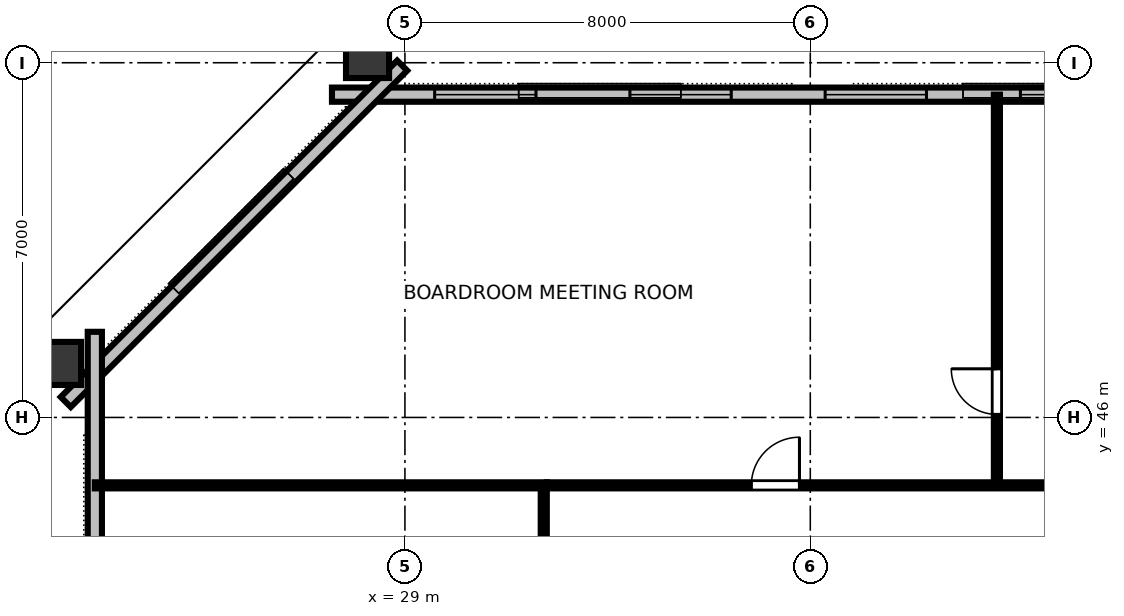
"""IFC4 building model, lengths in metres.
Left out: names, types, materials, properties, quantities, classifications, styles, units other than length and angle.
Written with IfcOpenShell. Run it as: python <this file> out.ifc"""

import sys

from ifc_helpers import new_model, si_unit, direction, frame, frame_2d, origin, origin_2d, place, context, subcontext, project, spatial, rectangle, hollow_rectangle, extrude, element, fill, save


model = new_model("IFC4")
c1 = context("Model", 3, precision=1e-05, world=origin(), true_north=direction((0.0, 1.0)))
c2 = subcontext(c1, "Body", "Model", "MODEL_VIEW")
j1 = project(units=[si_unit("LENGTHUNIT", "METRE"), si_unit("PLANEANGLEUNIT", "RADIAN")], contexts=[c1])
p1 = place(None, origin())
s1 = spatial("IfcSite", under=j1, at=p1, CompositionType="ELEMENT")
p2 = place(p1, origin())
s2 = spatial("IfcBuilding", under=s1, at=p2, CompositionType="ELEMENT")
p3 = place(p2, frame((0.0, 0.0, 156.4)))
s3 = spatial("IfcBuildingStorey", under=s2, at=p3, CompositionType="ELEMENT", Elevation=156.4)
p4 = place(p3, frame((28.262, 53.198, 0.0), z_axis=(-0.059345391748, 0.074109367256, 0.995482760355), x_axis=(-0.780571247111, -0.625066818975, 0.0)))
e1 = element("IfcColumn", 1, at=p4, inside=s3, PredefinedType="COLUMN", context=c2, shape_type="SweptSolid", body=[
    extrude(hollow_rectangle(XDim=0.85, YDim=1.0, WallThickness=0.05, at=origin_2d()), origin(), (0.0, 0.0, 1.0), 3.373),
])
p5 = place(p3, frame((22.109, 47.066, 0.0), z_axis=(-0.088690794811, 0.044634763783, 0.995058631829), x_axis=(0.888844480388, -0.447322222186, 0.099289068996)))
e2 = element("IfcColumn", 2, at=p5, inside=s3, PredefinedType="COLUMN", context=c2, shape_type="SweptSolid", body=[
    extrude(hollow_rectangle(XDim=0.85, YDim=1.0, WallThickness=0.05, at=origin_2d()), origin(), (0.0, 0.0, 1.0), 3.375),
])
p6 = place(p3, frame((64.44, 52.37, 0.0), z_axis=(0.0, 0.0, 1.0), x_axis=(-1.0, 0.0, 0.0)))
e3 = element("IfcWall", 3, at=p6, inside=s3, PredefinedType="STANDARD", context=c2, shape_type="SweptSolid", body=[
    extrude(rectangle(XDim=36.88, YDim=0.28, at=frame_2d((18.44, 0.0))), origin(), (0.0, 0.0, 1.0), 3.36),
])
p7 = place(p6, frame((2.027, 0.0, 0.8)))
e4 = element("IfcOpeningElement", 4, at=p7, cuts=e3, PredefinedType="OPENING", context=c2, shape_type="SweptSolid", body=[
    extrude(rectangle(XDim=2.0, YDim=1.95, at=frame_2d((1.0, 0.975))), frame((0.0, 0.15, 0.0), z_axis=(0.0, -1.0, 0.0), x_axis=(1.0, 0.0, 0.0)), (0.0, 0.0, 1.0), 0.3),
])
p8 = place(p6, frame((5.88, 0.0, 0.8)))
e5 = element("IfcOpeningElement", 5, at=p8, cuts=e3, PredefinedType="OPENING", context=c2, shape_type="SweptSolid", body=[
    extrude(rectangle(XDim=2.0, YDim=1.95, at=frame_2d((1.0, 0.975))), frame((0.0, 0.15, 0.0), z_axis=(0.0, -1.0, 0.0), x_axis=(1.0, 0.0, 0.0)), (0.0, 0.0, 1.0), 0.3),
])
p9 = place(p6, frame((13.587, 0.0, 0.8)))
e6 = element("IfcOpeningElement", 6, at=p9, cuts=e3, PredefinedType="OPENING", context=c2, shape_type="SweptSolid", body=[
    extrude(rectangle(XDim=2.0, YDim=1.95, at=frame_2d((1.0, 0.975))), frame((0.0, 0.15, 0.0), z_axis=(0.0, -1.0, 0.0), x_axis=(1.0, 0.0, 0.0)), (0.0, 0.0, 1.0), 0.3),
])
p10 = place(p6, frame((21.293, 0.0, 0.8)))
e7 = element("IfcOpeningElement", 7, at=p10, cuts=e3, PredefinedType="OPENING", context=c2, shape_type="SweptSolid", body=[
    extrude(rectangle(XDim=2.0, YDim=1.95, at=frame_2d((1.0, 0.975))), frame((0.0, 0.15, 0.0), z_axis=(0.0, -1.0, 0.0), x_axis=(1.0, 0.0, 0.0)), (0.0, 0.0, 1.0), 0.3),
])
p11 = place(p6, frame((25.147, 0.0, 0.8)))
e8 = element("IfcOpeningElement", 8, at=p11, cuts=e3, PredefinedType="OPENING", context=c2, shape_type="SweptSolid", body=[
    extrude(rectangle(XDim=2.0, YDim=1.95, at=frame_2d((1.0, 0.975))), frame((0.0, 0.15, 0.0), z_axis=(0.0, -1.0, 0.0), x_axis=(1.0, 0.0, 0.0)), (0.0, 0.0, 1.0), 0.3),
])
p12 = place(p6, frame((29.0, 0.0, 0.8)))
e9 = element("IfcOpeningElement", 9, at=p12, cuts=e3, PredefinedType="OPENING", context=c2, shape_type="SweptSolid", body=[
    extrude(rectangle(XDim=2.0, YDim=1.95, at=frame_2d((1.0, 0.975))), frame((0.0, 0.15, 0.0), z_axis=(0.0, -1.0, 0.0), x_axis=(1.0, 0.0, 0.0)), (0.0, 0.0, 1.0), 0.3),
])
p13 = place(p6, frame((32.853, 0.0, 0.8)))
e10 = element("IfcOpeningElement", 10, at=p13, cuts=e3, PredefinedType="OPENING", context=c2, shape_type="SweptSolid", body=[
    extrude(rectangle(XDim=2.0, YDim=1.95, at=frame_2d((1.0, 0.975))), frame((0.0, 0.15, 0.0), z_axis=(0.0, -1.0, 0.0), x_axis=(1.0, 0.0, 0.0)), (0.0, 0.0, 1.0), 0.3),
])
p14 = place(p3, frame((28.946, 52.944, 0.0), z_axis=(0.0, 0.0, 1.0), x_axis=(-0.707106781187, -0.707106781187, 0.0)))
e11 = element("IfcWall", 11, at=p14, inside=s3, PredefinedType="STANDARD", context=c2, shape_type="SweptSolid", body=[
    extrude(rectangle(XDim=9.39, YDim=0.28, at=frame_2d((4.695, 0.0))), origin(), (0.0, 0.0, 1.0), 3.36),
])
p15 = place(p3, frame((22.88, 47.69, 0.0), z_axis=(0.0, 0.0, 1.0), x_axis=(0.0, -1.0, 0.0)))
e12 = element("IfcWall", 12, at=p15, inside=s3, PredefinedType="STANDARD", context=c2, shape_type="SweptSolid", body=[
    extrude(rectangle(XDim=31.38, YDim=0.28, at=frame_2d((15.69, 0.0))), origin(), (0.0, 0.0, 1.0), 3.36),
])
p16 = place(p15, frame((5.571, 0.0, 0.8)))
e13 = element("IfcOpeningElement", 13, at=p16, cuts=e12, PredefinedType="OPENING", context=c2, shape_type="SweptSolid", body=[
    extrude(rectangle(XDim=2.0, YDim=1.95, at=frame_2d((1.0, 0.975))), frame((0.0, 0.15, 0.0), z_axis=(0.0, -1.0, 0.0), x_axis=(1.0, 0.0, 0.0)), (0.0, 0.0, 1.0), 0.3),
])
p17 = place(p15, frame((12.866, 0.0, 0.8)))
e14 = element("IfcOpeningElement", 14, at=p17, cuts=e12, PredefinedType="OPENING", context=c2, shape_type="SweptSolid", body=[
    extrude(rectangle(XDim=2.0, YDim=1.95, at=frame_2d((1.0, 0.975))), frame((0.0, 0.15, 0.0), z_axis=(0.0, -1.0, 0.0), x_axis=(1.0, 0.0, 0.0)), (0.0, 0.0, 1.0), 0.3),
])
p18 = place(p15, frame((16.514, 0.0, 0.8)))
e15 = element("IfcOpeningElement", 15, at=p18, cuts=e12, PredefinedType="OPENING", context=c2, shape_type="SweptSolid", body=[
    extrude(rectangle(XDim=2.0, YDim=1.95, at=frame_2d((1.0, 0.975))), frame((0.0, 0.15, 0.0), z_axis=(0.0, -1.0, 0.0), x_axis=(1.0, 0.0, 0.0)), (0.0, 0.0, 1.0), 0.3),
])
p19 = place(p15, frame((20.161, 0.0, 0.8)))
e16 = element("IfcOpeningElement", 16, at=p19, cuts=e12, PredefinedType="OPENING", context=c2, shape_type="SweptSolid", body=[
    extrude(rectangle(XDim=2.0, YDim=1.95, at=frame_2d((1.0, 0.975))), frame((0.0, 0.15, 0.0), z_axis=(0.0, -1.0, 0.0), x_axis=(1.0, 0.0, 0.0)), (0.0, 0.0, 1.0), 0.3),
])
p20 = place(p15, frame((23.809, 0.0, 0.8)))
e17 = element("IfcOpeningElement", 17, at=p20, cuts=e12, PredefinedType="OPENING", context=c2, shape_type="SweptSolid", body=[
    extrude(rectangle(XDim=2.0, YDim=1.95, at=frame_2d((1.0, 0.975))), frame((0.0, 0.15, 0.0), z_axis=(0.0, -1.0, 0.0), x_axis=(1.0, 0.0, 0.0)), (0.0, 0.0, 1.0), 0.3),
])
p21 = place(p3, frame((40.683, 44.66, 0.0), z_axis=(0.0, 0.0, 1.0), x_axis=(0.0, 1.0, 0.0)))
e18 = element("IfcWall", 18, at=p21, inside=s3, PredefinedType="PARTITIONING", context=c2, shape_type="SweptSolid", body=[
    extrude(rectangle(XDim=7.71, YDim=0.12, at=frame_2d((3.855, 0.0))), origin(), (0.0, 0.0, 1.0), 2.64),
])
p22 = place(p21, frame((1.4, 0.0, 0.0)))
e19 = element("IfcOpeningElement", 19, at=p22, cuts=e18, PredefinedType="OPENING", context=c2, shape_type="SweptSolid", body=[
    extrude(rectangle(XDim=0.9, YDim=2.15, at=frame_2d((0.45, 1.075))), frame((0.0, 0.07, 0.0), z_axis=(0.0, -1.0, 0.0), x_axis=(1.0, 0.0, 0.0)), (0.0, 0.0, 1.0), 0.14),
])
p23 = place(p3, frame((31.8, 44.66, 0.0), z_axis=(0.0, 0.0, 1.0), x_axis=(1.0, 0.0, 0.0)))
e20 = element("IfcWall", 20, at=p23, inside=s3, PredefinedType="PARTITIONING", context=c2, shape_type="SweptSolid", body=[
    extrude(rectangle(XDim=28.4, YDim=0.12, at=frame_2d((14.2, 0.0))), origin(), (0.0, 0.0, 1.0), 2.64),
])
p24 = place(p23, frame((4.036, 0.0, 0.0)))
e21 = element("IfcOpeningElement", 21, at=p24, cuts=e20, PredefinedType="OPENING", context=c2, shape_type="SweptSolid", body=[
    extrude(rectangle(XDim=0.95, YDim=2.15, at=frame_2d((0.475, 1.075))), frame((0.0, 0.07, 0.0), z_axis=(0.0, -1.0, 0.0), x_axis=(1.0, 0.0, 0.0)), (0.0, 0.0, 1.0), 0.14),
])
p25 = place(p23, frame((12.256, 0.0, 0.0)))
e22 = element("IfcOpeningElement", 22, at=p25, cuts=e20, PredefinedType="OPENING", context=c2, shape_type="SweptSolid", body=[
    extrude(rectangle(XDim=0.95, YDim=2.15, at=frame_2d((0.475, 1.075))), frame((0.0, 0.07, 0.0), z_axis=(0.0, -1.0, 0.0), x_axis=(1.0, 0.0, 0.0)), (0.0, 0.0, 1.0), 0.14),
])
p26 = place(p23, frame((18.246, 0.0, 0.0)))
e23 = element("IfcOpeningElement", 23, at=p26, cuts=e20, PredefinedType="OPENING", context=c2, shape_type="SweptSolid", body=[
    extrude(rectangle(XDim=0.95, YDim=2.15, at=frame_2d((0.475, 1.075))), frame((0.0, 0.07, 0.0), z_axis=(0.0, -1.0, 0.0), x_axis=(1.0, 0.0, 0.0)), (0.0, 0.0, 1.0), 0.14),
])
p27 = place(p23, frame((24.086, 0.0, 0.0)))
e24 = element("IfcOpeningElement", 24, at=p27, cuts=e20, PredefinedType="OPENING", context=c2, shape_type="SweptSolid", body=[
    extrude(rectangle(XDim=0.95, YDim=2.15, at=frame_2d((0.475, 1.075))), frame((0.0, 0.07, 0.0), z_axis=(0.0, -1.0, 0.0), x_axis=(1.0, 0.0, 0.0)), (0.0, 0.0, 1.0), 0.14),
])
p28 = place(p3, frame((31.74, 33.02, 0.0), z_axis=(0.0, 0.0, 1.0), x_axis=(0.0, 1.0, 0.0)))
e25 = element("IfcWall", 25, at=p28, inside=s3, PredefinedType="PARTITIONING", context=c2, shape_type="SweptSolid", body=[
    extrude(rectangle(XDim=11.58, YDim=0.12, at=frame_2d((5.79, 0.0))), origin(), (0.0, 0.0, 1.0), 2.64),
])
p29 = place(p28, frame((1.44, 0.0, 0.0)))
e26 = element("IfcOpeningElement", 26, at=p29, cuts=e25, PredefinedType="OPENING", context=c2, shape_type="SweptSolid", body=[
    extrude(rectangle(XDim=0.95, YDim=2.15, at=frame_2d((0.475, 1.075))), frame((0.0, 0.07, 0.0), z_axis=(0.0, -1.0, 0.0), x_axis=(1.0, 0.0, 0.0)), (0.0, 0.0, 1.0), 0.14),
])
p30 = place(p28, frame((7.13, 0.0, 0.0)))
e27 = element("IfcOpeningElement", 27, at=p30, cuts=e25, PredefinedType="OPENING", context=c2, shape_type="SweptSolid", body=[
    extrude(rectangle(XDim=0.95, YDim=2.15, at=frame_2d((0.475, 1.075))), frame((0.0, 0.07, 0.0), z_axis=(0.0, -1.0, 0.0), x_axis=(1.0, 0.0, 0.0)), (0.0, 0.0, 1.0), 0.14),
])
p31 = place(p3, frame((31.8, 44.66, 0.0), z_axis=(0.0, 0.0, 1.0), x_axis=(-1.0, 0.0, 0.0)))
e28 = element("IfcWall", 28, at=p31, inside=s3, PredefinedType="PARTITIONING", context=c2, shape_type="SweptSolid", body=[
    extrude(rectangle(XDim=8.92, YDim=0.12, at=frame_2d((4.46, 0.0))), origin(), (0.0, 0.0, 1.0), 2.64),
])
p32 = place(p10, origin())
e29 = element("IfcWindow", 29, at=p32, inside=s3, PartitioningType="SINGLE_PANEL", PredefinedType="WINDOW", context=c2, shape_type="SweptSolid", body=[
    extrude(rectangle(XDim=2.0, YDim=1.95, at=frame_2d((1.0, 0.975))), frame((0.0, 0.03, 0.0), z_axis=(0.0, -1.0, 0.0), x_axis=(1.0, 0.0, 0.0)), (0.0, 0.0, 1.0), 0.06),
])
fill(e7, e29)
p33 = place(p11, origin())
e30 = element("IfcWindow", 30, at=p33, inside=s3, PartitioningType="SINGLE_PANEL", PredefinedType="WINDOW", context=c2, shape_type="SweptSolid", body=[
    extrude(rectangle(XDim=2.0, YDim=1.95, at=frame_2d((1.0, 0.975))), frame((0.0, 0.03, 0.0), z_axis=(0.0, -1.0, 0.0), x_axis=(1.0, 0.0, 0.0)), (0.0, 0.0, 1.0), 0.06),
])
fill(e8, e30)
p34 = place(p12, origin())
e31 = element("IfcWindow", 31, at=p34, inside=s3, PartitioningType="SINGLE_PANEL", PredefinedType="WINDOW", context=c2, shape_type="SweptSolid", body=[
    extrude(rectangle(XDim=2.0, YDim=1.95, at=frame_2d((1.0, 0.975))), frame((0.0, 0.03, 0.0), z_axis=(0.0, -1.0, 0.0), x_axis=(1.0, 0.0, 0.0)), (0.0, 0.0, 1.0), 0.06),
])
fill(e9, e31)
p35 = place(p13, origin())
e32 = element("IfcWindow", 32, at=p35, inside=s3, PartitioningType="SINGLE_PANEL", PredefinedType="WINDOW", context=c2, shape_type="SweptSolid", body=[
    extrude(rectangle(XDim=2.0, YDim=1.95, at=frame_2d((1.0, 0.975))), frame((0.0, 0.03, 0.0), z_axis=(0.0, -1.0, 0.0), x_axis=(1.0, 0.0, 0.0)), (0.0, 0.0, 1.0), 0.06),
])
fill(e10, e32)
p36 = place(p22, origin())
e33 = element("IfcDoor", 33, at=p36, inside=s3, OperationType="SINGLE_SWING_RIGHT", PredefinedType="DOOR", context=c2, shape_type="SweptSolid", body=[
    extrude(rectangle(XDim=0.9, YDim=2.15, at=frame_2d((0.45, 1.075))), frame((0.0, 0.025, 0.0), z_axis=(0.0, -1.0, 0.0), x_axis=(1.0, 0.0, 0.0)), (0.0, 0.0, 1.0), 0.05),
])
fill(e19, e33)
p37 = place(p24, origin())
e34 = element("IfcDoor", 34, at=p37, inside=s3, OperationType="SINGLE_SWING_RIGHT", PredefinedType="DOOR", context=c2, shape_type="SweptSolid", body=[
    extrude(rectangle(XDim=0.95, YDim=2.15, at=frame_2d((0.475, 1.075))), frame((0.0, 0.025, 0.0), z_axis=(0.0, -1.0, 0.0), x_axis=(1.0, 0.0, 0.0)), (0.0, 0.0, 1.0), 0.05),
])
fill(e21, e34)
save(model, sys.argv[1])
